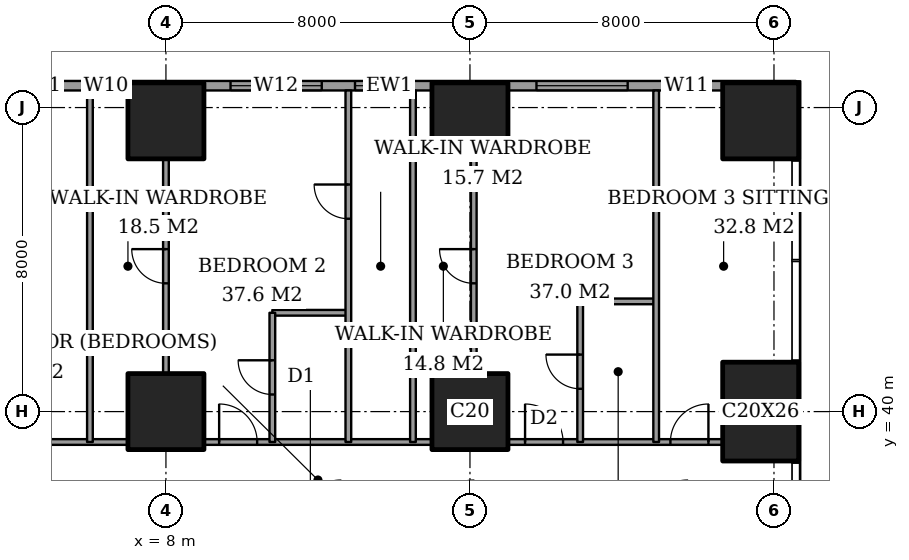
"""IFC4 building model, lengths in metres.
Left out: names, types, materials, properties, quantities, classifications, styles, units other than length and angle.
Written with IfcOpenShell. Run it as: python <this file> out.ifc"""

import sys

from ifc_helpers import new_model, si_unit, direction, frame, frame_2d, origin, origin_2d, place, context, subcontext, project, spatial, rectangle, extrude, element, fill, save


model = new_model("IFC4")
c1 = context("Model", 3, precision=1e-05, world=origin(), true_north=direction((0.0, 1.0)))
c2 = subcontext(c1, "Body", "Model", "MODEL_VIEW")
j1 = project(units=[si_unit("LENGTHUNIT", "METRE"), si_unit("PLANEANGLEUNIT", "RADIAN")], contexts=[c1])
p1 = place(None, origin())
s1 = spatial("IfcSite", under=j1, at=p1, CompositionType="ELEMENT")
p2 = place(p1, origin())
s2 = spatial("IfcBuilding", under=s1, at=p2, CompositionType="ELEMENT")
p3 = place(p2, frame((0.0, 0.0, 125.0)))
s3 = spatial("IfcBuildingStorey", under=s2, at=p3, CompositionType="ELEMENT", Elevation=125.0)
for number, where, z_axis, x_axis in (
    (1, (8.0, 40.0, 0.0), (0.0, 0.0, 1.0), (1.0, 0.0, 0.0)),
    (2, (8.0, 47.65, 0.0), (0.0, 0.0, 1.0), (1.0, 0.0, 0.0)),
    (3, (16.0, 40.0, 0.0), (0.0, 0.0, 1.0), (1.0, 0.0, 0.0)),
    (4, (16.0, 47.65, 0.0), (0.0, 0.0, 1.0), (1.0, 0.0, 0.0)),
):
    element("IfcColumn", number, at=place(p3, frame(where, z_axis=z_axis, x_axis=x_axis)), inside=s3, PredefinedType="COLUMN", context=c2, shape_type="SweptSolid", body=[
        extrude(rectangle(XDim=2.0, YDim=2.0, at=origin_2d()), origin(), (0.0, 0.0, 1.0), 3.6),
    ])
p4 = place(p3, frame((23.65, 40.0, 0.0), z_axis=(0.0, 0.0, 1.0), x_axis=(1.0, 0.0, 0.0)))
e5 = element("IfcColumn", 5, at=p4, inside=s3, PredefinedType="COLUMN", context=c2, shape_type="SweptSolid", body=[
    extrude(rectangle(XDim=2.0, YDim=2.6, at=origin_2d()), origin(), (0.0, 0.0, 1.0), 3.6),
])
p5 = place(p3, frame((23.65, 47.65, 0.0), z_axis=(0.0, 0.0, 1.0), x_axis=(1.0, 0.0, 0.0)))
e6 = element("IfcColumn", 6, at=p5, inside=s3, PredefinedType="COLUMN", context=c2, shape_type="SweptSolid", body=[
    extrude(rectangle(XDim=2.0, YDim=2.0, at=origin_2d()), origin(), (0.0, 0.0, 1.0), 3.6),
])
p6 = place(p3, frame((24.575, 48.575, 0.0), z_axis=(0.0, 0.0, 1.0), x_axis=(-1.0, 0.0, 0.0)))
e7 = element("IfcWall", 7, at=p6, inside=s3, PredefinedType="SOLIDWALL", context=c2, shape_type="SweptSolid", body=[
    extrude(rectangle(XDim=21.4, YDim=0.25, at=frame_2d((10.7, 0.0))), origin(), (0.0, 0.0, 1.0), 3.6),
])
p7 = place(p6, frame((2.275, 0.0, 0.4)))
e8 = element("IfcOpeningElement", 8, at=p7, cuts=e7, PredefinedType="OPENING", context=c2, shape_type="SweptSolid", body=[
    extrude(rectangle(XDim=1.2, YDim=2.2, at=frame_2d((0.6, 1.1))), frame((0.0, 0.135, 0.0), z_axis=(0.0, -1.0, 0.0), x_axis=(1.0, 0.0, 0.0)), (0.0, 0.0, 1.0), 0.27),
])
p8 = place(p6, frame((4.425, 0.0, 0.4)))
e9 = element("IfcOpeningElement", 9, at=p8, cuts=e7, PredefinedType="OPENING", context=c2, shape_type="SweptSolid", body=[
    extrude(rectangle(XDim=2.4, YDim=2.2, at=frame_2d((1.2, 1.1))), frame((0.0, 0.135, 0.0), z_axis=(0.0, -1.0, 0.0), x_axis=(1.0, 0.0, 0.0)), (0.0, 0.0, 1.0), 0.27),
])
p9 = place(p6, frame((10.4, 0.0, 0.4)))
e10 = element("IfcOpeningElement", 10, at=p9, cuts=e7, PredefinedType="OPENING", context=c2, shape_type="SweptSolid", body=[
    extrude(rectangle(XDim=1.2, YDim=2.2, at=frame_2d((0.6, 1.1))), frame((0.0, 0.135, 0.0), z_axis=(0.0, -1.0, 0.0), x_axis=(1.0, 0.0, 0.0)), (0.0, 0.0, 1.0), 0.27),
])
p10 = place(p6, frame((12.475, 0.0, 0.4)))
e11 = element("IfcOpeningElement", 11, at=p10, cuts=e7, PredefinedType="OPENING", context=c2, shape_type="SweptSolid", body=[
    extrude(rectangle(XDim=2.4, YDim=2.2, at=frame_2d((1.2, 1.1))), frame((0.0, 0.135, 0.0), z_axis=(0.0, -1.0, 0.0), x_axis=(1.0, 0.0, 0.0)), (0.0, 0.0, 1.0), 0.27),
])
p11 = place(p6, frame((17.85, 0.0, 0.4)))
e12 = element("IfcOpeningElement", 12, at=p11, cuts=e7, PredefinedType="OPENING", context=c2, shape_type="SweptSolid", body=[
    extrude(rectangle(XDim=0.6, YDim=2.2, at=frame_2d((0.3, 1.1))), frame((0.0, 0.135, 0.0), z_axis=(0.0, -1.0, 0.0), x_axis=(1.0, 0.0, 0.0)), (0.0, 0.0, 1.0), 0.27),
])
p12 = place(p6, frame((19.325, 0.0, 0.4)))
e13 = element("IfcOpeningElement", 13, at=p12, cuts=e7, PredefinedType="OPENING", context=c2, shape_type="SweptSolid", body=[
    extrude(rectangle(XDim=1.2, YDim=2.2, at=frame_2d((0.6, 1.1))), frame((0.0, 0.135, 0.0), z_axis=(0.0, -1.0, 0.0), x_axis=(1.0, 0.0, 0.0)), (0.0, 0.0, 1.0), 0.27),
])
p13 = place(p3, frame((1.35, 39.2, 0.0), z_axis=(0.0, 0.0, 1.0), x_axis=(1.0, 0.0, 0.0)))
e14 = element("IfcWall", 14, at=p13, inside=s3, PredefinedType="PARTITIONING", context=c2, shape_type="SweptSolid", body=[
    extrude(rectangle(XDim=5.65, YDim=0.15, at=frame_2d((2.825, 0.0))), origin(), (0.0, 0.0, 1.0), 3.35),
])
p14 = place(p13, frame((1.825, 0.0, 0.0)))
e15 = element("IfcOpeningElement", 15, at=p14, cuts=e14, PredefinedType="OPENING", context=c2, shape_type="SweptSolid", body=[
    extrude(rectangle(XDim=1.0, YDim=2.1, at=frame_2d((0.5, 1.05))), frame((0.0, 0.085, 0.0), z_axis=(0.0, -1.0, 0.0), x_axis=(1.0, 0.0, 0.0)), (0.0, 0.0, 1.0), 0.17),
])
p15 = place(p3, frame((9.0, 39.2, 0.0), z_axis=(0.0, 0.0, 1.0), x_axis=(1.0, 0.0, 0.0)))
e16 = element("IfcWall", 16, at=p15, inside=s3, PredefinedType="PARTITIONING", context=c2, shape_type="SweptSolid", body=[
    extrude(rectangle(XDim=6.0, YDim=0.15, at=frame_2d((3.0, 0.0))), origin(), (0.0, 0.0, 1.0), 3.35),
])
p16 = place(p15, frame((0.4, 0.0, 0.0)))
e17 = element("IfcOpeningElement", 17, at=p16, cuts=e16, PredefinedType="OPENING", context=c2, shape_type="SweptSolid", body=[
    extrude(rectangle(XDim=1.0, YDim=2.1, at=frame_2d((0.5, 1.05))), frame((0.0, 0.085, 0.0), z_axis=(0.0, -1.0, 0.0), x_axis=(1.0, 0.0, 0.0)), (0.0, 0.0, 1.0), 0.17),
])
p17 = place(p3, frame((17.0, 39.2, 0.0), z_axis=(0.0, 0.0, 1.0), x_axis=(1.0, 0.0, 0.0)))
e18 = element("IfcWall", 18, at=p17, inside=s3, PredefinedType="PARTITIONING", context=c2, shape_type="SweptSolid", body=[
    extrude(rectangle(XDim=5.65, YDim=0.15, at=frame_2d((2.825, 0.0))), origin(), (0.0, 0.0, 1.0), 3.35),
])
p18 = place(p17, frame((0.45, 0.0, 0.0)))
e19 = element("IfcOpeningElement", 19, at=p18, cuts=e18, PredefinedType="OPENING", context=c2, shape_type="SweptSolid", body=[
    extrude(rectangle(XDim=1.0, YDim=2.1, at=frame_2d((0.5, 1.05))), frame((0.0, 0.085, 0.0), z_axis=(0.0, -1.0, 0.0), x_axis=(1.0, 0.0, 0.0)), (0.0, 0.0, 1.0), 0.17),
])
p19 = place(p17, frame((4.275, 0.0, 0.0)))
e20 = element("IfcOpeningElement", 20, at=p19, cuts=e18, PredefinedType="OPENING", context=c2, shape_type="SweptSolid", body=[
    extrude(rectangle(XDim=1.0, YDim=2.1, at=frame_2d((0.5, 1.05))), frame((0.0, 0.085, 0.0), z_axis=(0.0, -1.0, 0.0), x_axis=(1.0, 0.0, 0.0)), (0.0, 0.0, 1.0), 0.17),
])
for number, where, z_axis, x_axis in (
    (21, (10.8, 42.6, 0.0), (0.0, 0.0, 1.0), (1.0, 0.0, 0.0)),
    (22, (18.9, 42.9, 0.0), (0.0, 0.0, 1.0), (1.0, 0.0, 0.0)),
):
    element("IfcWall", number, at=place(p3, frame(where, z_axis=z_axis, x_axis=x_axis)), inside=s3, PredefinedType="PARTITIONING", context=c2, shape_type="SweptSolid", body=[
        extrude(rectangle(XDim=2.0, YDim=0.15, at=frame_2d((1.0, 0.0))), origin(), (0.0, 0.0, 1.0), 3.35),
    ])
p20 = place(p3, frame((6.0, 39.2, 0.0), z_axis=(0.0, 0.0, 1.0), x_axis=(0.0, 1.0, 0.0)))
e23 = element("IfcWall", 23, at=p20, inside=s3, PredefinedType="PARTITIONING", context=c2, shape_type="SweptSolid", body=[
    extrude(rectangle(XDim=9.25, YDim=0.15, at=frame_2d((4.625, 0.0))), origin(), (0.0, 0.0, 1.0), 3.35),
])
p21 = place(p3, frame((8.0, 41.0, 0.0), z_axis=(0.0, 0.0, 1.0), x_axis=(0.0, 1.0, 0.0)))
e24 = element("IfcWall", 24, at=p21, inside=s3, PredefinedType="PARTITIONING", context=c2, shape_type="SweptSolid", body=[
    extrude(rectangle(XDim=5.65, YDim=0.15, at=frame_2d((2.825, 0.0))), origin(), (0.0, 0.0, 1.0), 3.35),
])
p22 = place(p21, frame((2.375, 0.0, 0.0)))
e25 = element("IfcOpeningElement", 25, at=p22, cuts=e24, PredefinedType="OPENING", context=c2, shape_type="SweptSolid", body=[
    extrude(rectangle(XDim=0.9, YDim=2.1, at=frame_2d((0.45, 1.05))), frame((0.0, 0.085, 0.0), z_axis=(0.0, -1.0, 0.0), x_axis=(1.0, 0.0, 0.0)), (0.0, 0.0, 1.0), 0.17),
])
p23 = place(p3, frame((10.8, 39.2, 0.0), z_axis=(0.0, 0.0, 1.0), x_axis=(0.0, 1.0, 0.0)))
e26 = element("IfcWall", 26, at=p23, inside=s3, PredefinedType="PARTITIONING", context=c2, shape_type="SweptSolid", body=[
    extrude(rectangle(XDim=3.4, YDim=0.15, at=frame_2d((1.7, 0.0))), origin(), (0.0, 0.0, 1.0), 3.35),
])
p24 = place(p23, frame((1.25, 0.0, 0.0)))
e27 = element("IfcOpeningElement", 27, at=p24, cuts=e26, PredefinedType="OPENING", context=c2, shape_type="SweptSolid", body=[
    extrude(rectangle(XDim=0.9, YDim=2.1, at=frame_2d((0.45, 1.05))), frame((0.0, 0.085, 0.0), z_axis=(0.0, -1.0, 0.0), x_axis=(1.0, 0.0, 0.0)), (0.0, 0.0, 1.0), 0.17),
])
p25 = place(p3, frame((12.8, 39.2, 0.0), z_axis=(0.0, 0.0, 1.0), x_axis=(0.0, 1.0, 0.0)))
e28 = element("IfcWall", 28, at=p25, inside=s3, PredefinedType="PARTITIONING", context=c2, shape_type="SweptSolid", body=[
    extrude(rectangle(XDim=9.25, YDim=0.15, at=frame_2d((4.625, 0.0))), origin(), (0.0, 0.0, 1.0), 3.35),
])
p26 = place(p25, frame((5.875, 0.0, 0.0)))
e29 = element("IfcOpeningElement", 29, at=p26, cuts=e28, PredefinedType="OPENING", context=c2, shape_type="SweptSolid", body=[
    extrude(rectangle(XDim=0.9, YDim=2.1, at=frame_2d((0.45, 1.05))), frame((0.0, 0.085, 0.0), z_axis=(0.0, -1.0, 0.0), x_axis=(1.0, 0.0, 0.0)), (0.0, 0.0, 1.0), 0.17),
])
p27 = place(p3, frame((14.5, 39.2, 0.0), z_axis=(0.0, 0.0, 1.0), x_axis=(0.0, 1.0, 0.0)))
e30 = element("IfcWall", 30, at=p27, inside=s3, PredefinedType="PARTITIONING", context=c2, shape_type="SweptSolid", body=[
    extrude(rectangle(XDim=9.25, YDim=0.15, at=frame_2d((4.625, 0.0))), origin(), (0.0, 0.0, 1.0), 3.35),
])
p28 = place(p3, frame((16.1, 41.0, 0.0), z_axis=(0.0, 0.0, 1.0), x_axis=(0.0, 1.0, 0.0)))
e31 = element("IfcWall", 31, at=p28, inside=s3, PredefinedType="PARTITIONING", context=c2, shape_type="SweptSolid", body=[
    extrude(rectangle(XDim=5.65, YDim=0.15, at=frame_2d((2.825, 0.0))), origin(), (0.0, 0.0, 1.0), 3.35),
])
p29 = place(p28, frame((2.375, 0.0, 0.0)))
e32 = element("IfcOpeningElement", 32, at=p29, cuts=e31, PredefinedType="OPENING", context=c2, shape_type="SweptSolid", body=[
    extrude(rectangle(XDim=0.9, YDim=2.1, at=frame_2d((0.45, 1.05))), frame((0.0, 0.085, 0.0), z_axis=(0.0, -1.0, 0.0), x_axis=(1.0, 0.0, 0.0)), (0.0, 0.0, 1.0), 0.17),
])
p30 = place(p3, frame((18.9, 39.2, 0.0), z_axis=(0.0, 0.0, 1.0), x_axis=(0.0, 1.0, 0.0)))
e33 = element("IfcWall", 33, at=p30, inside=s3, PredefinedType="PARTITIONING", context=c2, shape_type="SweptSolid", body=[
    extrude(rectangle(XDim=3.7, YDim=0.15, at=frame_2d((1.85, 0.0))), origin(), (0.0, 0.0, 1.0), 3.35),
])
p31 = place(p30, frame((1.4, 0.0, 0.0)))
e34 = element("IfcOpeningElement", 34, at=p31, cuts=e33, PredefinedType="OPENING", context=c2, shape_type="SweptSolid", body=[
    extrude(rectangle(XDim=0.9, YDim=2.1, at=frame_2d((0.45, 1.05))), frame((0.0, 0.085, 0.0), z_axis=(0.0, -1.0, 0.0), x_axis=(1.0, 0.0, 0.0)), (0.0, 0.0, 1.0), 0.17),
])
p32 = place(p3, frame((20.9, 39.2, 0.0), z_axis=(0.0, 0.0, 1.0), x_axis=(0.0, 1.0, 0.0)))
e35 = element("IfcWall", 35, at=p32, inside=s3, PredefinedType="PARTITIONING", context=c2, shape_type="SweptSolid", body=[
    extrude(rectangle(XDim=9.25, YDim=0.15, at=frame_2d((4.625, 0.0))), origin(), (0.0, 0.0, 1.0), 3.35),
])
p33 = place(p7, origin())
e36 = element("IfcWindow", 36, at=p33, inside=s3, PartitioningType="SINGLE_PANEL", PredefinedType="WINDOW", context=c2, shape_type="SweptSolid", body=[
    extrude(rectangle(XDim=1.2, YDim=2.2, at=frame_2d((0.6, 1.1))), frame((0.0, 0.03, 0.0), z_axis=(0.0, -1.0, 0.0), x_axis=(1.0, 0.0, 0.0)), (0.0, 0.0, 1.0), 0.06),
])
fill(e8, e36)
p34 = place(p8, origin())
e37 = element("IfcWindow", 37, at=p34, inside=s3, PartitioningType="SINGLE_PANEL", PredefinedType="WINDOW", context=c2, shape_type="SweptSolid", body=[
    extrude(rectangle(XDim=2.4, YDim=2.2, at=frame_2d((1.2, 1.1))), frame((0.0, 0.03, 0.0), z_axis=(0.0, -1.0, 0.0), x_axis=(1.0, 0.0, 0.0)), (0.0, 0.0, 1.0), 0.06),
])
fill(e9, e37)
p35 = place(p9, origin())
e38 = element("IfcWindow", 38, at=p35, inside=s3, PartitioningType="SINGLE_PANEL", PredefinedType="WINDOW", context=c2, shape_type="SweptSolid", body=[
    extrude(rectangle(XDim=1.2, YDim=2.2, at=frame_2d((0.6, 1.1))), frame((0.0, 0.03, 0.0), z_axis=(0.0, -1.0, 0.0), x_axis=(1.0, 0.0, 0.0)), (0.0, 0.0, 1.0), 0.06),
])
fill(e10, e38)
p36 = place(p10, origin())
e39 = element("IfcWindow", 39, at=p36, inside=s3, PartitioningType="SINGLE_PANEL", PredefinedType="WINDOW", context=c2, shape_type="SweptSolid", body=[
    extrude(rectangle(XDim=2.4, YDim=2.2, at=frame_2d((1.2, 1.1))), frame((0.0, 0.03, 0.0), z_axis=(0.0, -1.0, 0.0), x_axis=(1.0, 0.0, 0.0)), (0.0, 0.0, 1.0), 0.06),
])
fill(e11, e39)
p37 = place(p11, origin())
e40 = element("IfcWindow", 40, at=p37, inside=s3, PartitioningType="SINGLE_PANEL", PredefinedType="WINDOW", context=c2, shape_type="SweptSolid", body=[
    extrude(rectangle(XDim=0.6, YDim=2.2, at=frame_2d((0.3, 1.1))), frame((0.0, 0.03, 0.0), z_axis=(0.0, -1.0, 0.0), x_axis=(1.0, 0.0, 0.0)), (0.0, 0.0, 1.0), 0.06),
])
fill(e12, e40)
p38 = place(p12, origin())
e41 = element("IfcWindow", 41, at=p38, inside=s3, PartitioningType="SINGLE_PANEL", PredefinedType="WINDOW", context=c2, shape_type="SweptSolid", body=[
    extrude(rectangle(XDim=1.2, YDim=2.2, at=frame_2d((0.6, 1.1))), frame((0.0, 0.03, 0.0), z_axis=(0.0, -1.0, 0.0), x_axis=(1.0, 0.0, 0.0)), (0.0, 0.0, 1.0), 0.06),
])
fill(e13, e41)
p39 = place(p22, origin())
e42 = element("IfcDoor", 42, at=p39, inside=s3, OperationType="SINGLE_SWING_LEFT", PredefinedType="DOOR", context=c2, shape_type="SweptSolid", body=[
    extrude(rectangle(XDim=0.9, YDim=2.1, at=frame_2d((0.45, 1.05))), frame((0.0, 0.025, 0.0), z_axis=(0.0, -1.0, 0.0), x_axis=(1.0, 0.0, 0.0)), (0.0, 0.0, 1.0), 0.05),
])
fill(e25, e42)
p40 = place(p24, origin())
e43 = element("IfcDoor", 43, at=p40, inside=s3, OperationType="SINGLE_SWING_LEFT", PredefinedType="DOOR", context=c2, shape_type="SweptSolid", body=[
    extrude(rectangle(XDim=0.9, YDim=2.1, at=frame_2d((0.45, 1.05))), frame((0.0, 0.025, 0.0), z_axis=(0.0, -1.0, 0.0), x_axis=(1.0, 0.0, 0.0)), (0.0, 0.0, 1.0), 0.05),
])
fill(e27, e43)
p41 = place(p16, origin())
e44 = element("IfcDoor", 44, at=p41, inside=s3, OperationType="SINGLE_SWING_RIGHT", PredefinedType="DOOR", context=c2, shape_type="SweptSolid", body=[
    extrude(rectangle(XDim=1.0, YDim=2.1, at=frame_2d((0.5, 1.05))), frame((0.0, 0.025, 0.0), z_axis=(0.0, -1.0, 0.0), x_axis=(1.0, 0.0, 0.0)), (0.0, 0.0, 1.0), 0.05),
])
fill(e17, e44)
p42 = place(p26, origin())
e45 = element("IfcDoor", 45, at=p42, inside=s3, OperationType="SINGLE_SWING_LEFT", PredefinedType="DOOR", context=c2, shape_type="SweptSolid", body=[
    extrude(rectangle(XDim=0.9, YDim=2.1, at=frame_2d((0.45, 1.05))), frame((0.0, 0.025, 0.0), z_axis=(0.0, -1.0, 0.0), x_axis=(1.0, 0.0, 0.0)), (0.0, 0.0, 1.0), 0.05),
])
fill(e29, e45)
p43 = place(p29, origin())
e46 = element("IfcDoor", 46, at=p43, inside=s3, OperationType="SINGLE_SWING_LEFT", PredefinedType="DOOR", context=c2, shape_type="SweptSolid", body=[
    extrude(rectangle(XDim=0.9, YDim=2.1, at=frame_2d((0.45, 1.05))), frame((0.0, 0.025, 0.0), z_axis=(0.0, -1.0, 0.0), x_axis=(1.0, 0.0, 0.0)), (0.0, 0.0, 1.0), 0.05),
])
fill(e32, e46)
p44 = place(p31, origin())
e47 = element("IfcDoor", 47, at=p44, inside=s3, OperationType="SINGLE_SWING_LEFT", PredefinedType="DOOR", context=c2, shape_type="SweptSolid", body=[
    extrude(rectangle(XDim=0.9, YDim=2.1, at=frame_2d((0.45, 1.05))), frame((0.0, 0.025, 0.0), z_axis=(0.0, -1.0, 0.0), x_axis=(1.0, 0.0, 0.0)), (0.0, 0.0, 1.0), 0.05),
])
fill(e34, e47)
p45 = place(p18, origin())
e48 = element("IfcDoor", 48, at=p45, inside=s3, OperationType="SINGLE_SWING_RIGHT", PredefinedType="DOOR", context=c2, shape_type="SweptSolid", body=[
    extrude(rectangle(XDim=1.0, YDim=2.1, at=frame_2d((0.5, 1.05))), frame((0.0, 0.025, 0.0), z_axis=(0.0, -1.0, 0.0), x_axis=(1.0, 0.0, 0.0)), (0.0, 0.0, 1.0), 0.05),
])
fill(e19, e48)
p46 = place(p19, origin())
e49 = element("IfcDoor", 49, at=p46, inside=s3, OperationType="SINGLE_SWING_LEFT", PredefinedType="DOOR", context=c2, shape_type="SweptSolid", body=[
    extrude(rectangle(XDim=1.0, YDim=2.1, at=frame_2d((0.5, 1.05))), frame((0.0, 0.025, 0.0), z_axis=(0.0, -1.0, 0.0), x_axis=(1.0, 0.0, 0.0)), (0.0, 0.0, 1.0), 0.05),
])
fill(e20, e49)
save(model, sys.argv[1])
